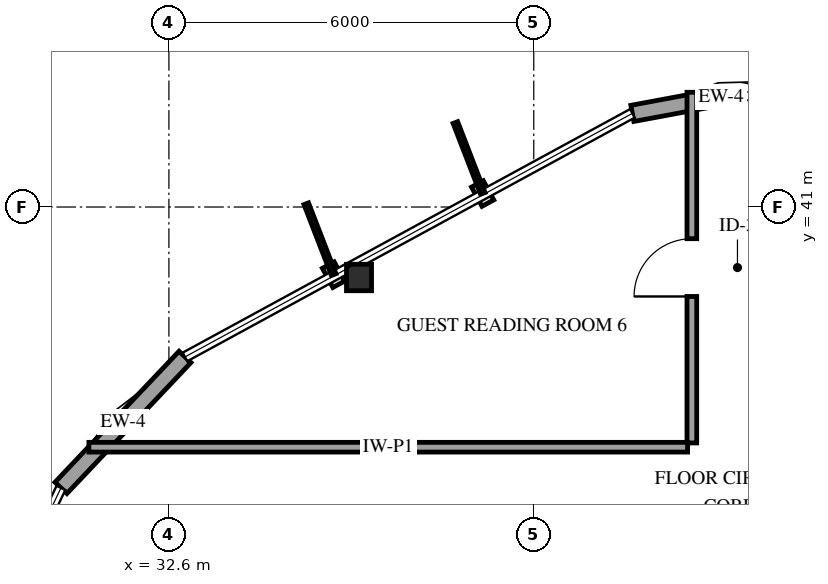
"""IFC4 building model, lengths in metres.
Left out: names, types, materials, properties, quantities, classifications, styles, units other than length and angle.
Written with IfcOpenShell. Run it as: python <this file> out.ifc"""

import sys

from ifc_helpers import new_model, si_unit, direction, frame, frame_2d, origin, origin_2d, place, context, subcontext, project, spatial, rectangle, i_section, extrude, element, fill, save


model = new_model("IFC4")
c1 = context("Model", 3, precision=1e-05, world=origin(), true_north=direction((0.0, 1.0)))
c2 = subcontext(c1, "Body", "Model", "MODEL_VIEW")
j1 = project(units=[si_unit("LENGTHUNIT", "METRE"), si_unit("PLANEANGLEUNIT", "RADIAN")], contexts=[c1])
p1 = place(None, origin())
s1 = spatial("IfcSite", under=j1, at=p1, CompositionType="ELEMENT")
p2 = place(p1, origin())
s2 = spatial("IfcBuilding", under=s1, at=p2, CompositionType="ELEMENT")
p3 = place(p2, frame((0.0, 0.0, 139.0)))
s3 = spatial("IfcBuildingStorey", under=s2, at=p3, CompositionType="ELEMENT", Elevation=139.0)
p4 = place(p3, frame((35.726, 39.841, -0.3), z_axis=(0.0, 0.0, 1.0), x_axis=(1.0, 0.0, 0.0)))
e1 = element("IfcColumn", 1, at=p4, inside=s3, PredefinedType="COLUMN", context=c2, shape_type="SweptSolid", body=[
    extrude(i_section(OverallWidth=0.412, OverallDepth=0.435, WebThickness=0.036, FlangeThickness=0.057, FilletRadius=0.038, at=origin_2d()), origin(), (0.0, 0.0, 1.0), 3.9),
])
p5 = place(p3, frame((43.138, 43.083, 0.0), z_axis=(0.0, 0.0, 1.0), x_axis=(-0.983060801599, -0.183279732538, 0.0)))
e2 = element("IfcWall", 2, at=p5, inside=s3, PredefinedType="SOLIDWALL", context=c2, shape_type="SweptSolid", body=[
    extrude(rectangle(XDim=2.967, YDim=0.27, at=frame_2d((1.483, 0.0))), origin(), (0.0, 0.0, 1.0), 2.679),
])
p6 = place(p5, frame((0.45, 0.0, 0.75)))
e3 = element("IfcOpeningElement", 3, at=p6, cuts=e2, PredefinedType="OPENING", context=c2, shape_type="SweptSolid", body=[
    extrude(rectangle(XDim=0.9, YDim=1.5, at=frame_2d((0.45, 0.75))), frame((0.0, 0.145, 0.0), z_axis=(0.0, -1.0, 0.0), x_axis=(1.0, 0.0, 0.0)), (0.0, 0.0, 1.0), 0.29),
])
p7 = place(p3, frame((32.865, 38.535, 0.0), z_axis=(0.0, 0.0, 1.0), x_axis=(-0.687587127065, -0.726101881759, 0.0)))
e4 = element("IfcWall", 4, at=p7, inside=s3, PredefinedType="SOLIDWALL", context=c2, shape_type="SweptSolid", body=[
    extrude(rectangle(XDim=2.967, YDim=0.27, at=frame_2d((1.483, 0.0))), origin(), (0.0, 0.0, 1.0), 2.679),
])
p8 = place(p3, frame((41.2, 37.12, 0.0), z_axis=(0.0, 0.0, 1.0), x_axis=(0.0, 1.0, 0.0)))
e5 = element("IfcWall", 5, at=p8, inside=s3, PredefinedType="PARTITIONING", context=c2, shape_type="SweptSolid", body=[
    extrude(rectangle(XDim=5.767, YDim=0.16, at=frame_2d((2.883, 0.0))), origin(), (0.0, 0.0, 1.0), 2.678),
])
p9 = place(p8, frame((2.409, 0.0, 0.0)))
e6 = element("IfcOpeningElement", 6, at=p9, cuts=e5, PredefinedType="OPENING", context=c2, shape_type="SweptSolid", body=[
    extrude(rectangle(XDim=0.95, YDim=2.15, at=frame_2d((0.475, 1.075))), frame((0.0, 0.09, 0.0), z_axis=(0.0, -1.0, 0.0), x_axis=(1.0, 0.0, 0.0)), (0.0, 0.0, 1.0), 0.18),
])
p10 = place(p3, frame((31.284, 37.05, 0.0), z_axis=(0.0, 0.0, 1.0), x_axis=(1.0, 0.0, 0.0)))
e7 = element("IfcWall", 7, at=p10, inside=s3, PredefinedType="PARTITIONING", context=c2, shape_type="SweptSolid", body=[
    extrude(rectangle(XDim=4.983, YDim=0.16, at=frame_2d((2.492, 0.0))), origin(), (0.0, 0.0, 1.0), 3.3),
])
p11 = place(p3, frame((36.268, 37.05, 0.0), z_axis=(0.0, 0.0, 1.0), x_axis=(1.0, 0.0, 0.0)))
e8 = element("IfcWall", 8, at=p11, inside=s3, PredefinedType="PARTITIONING", context=c2, shape_type="SweptSolid", body=[
    extrude(rectangle(XDim=4.862, YDim=0.16, at=frame_2d((2.431, 0.0))), origin(), (0.0, 0.0, 1.0), 3.3),
])
p12 = place(p6, origin())
e9 = element("IfcWindow", 9, at=p12, inside=s3, PartitioningType="SINGLE_PANEL", PredefinedType="WINDOW", context=c2, shape_type="SweptSolid", body=[
    extrude(rectangle(XDim=0.9, YDim=1.5, at=frame_2d((0.45, 0.75))), frame((0.0, 0.03, 0.0), z_axis=(0.0, -1.0, 0.0), x_axis=(1.0, 0.0, 0.0)), (0.0, 0.0, 1.0), 0.06),
])
fill(e3, e9)
p13 = place(p9, origin())
e10 = element("IfcDoor", 10, at=p13, inside=s3, OperationType="SINGLE_SWING_LEFT", PredefinedType="DOOR", context=c2, shape_type="SweptSolid", body=[
    extrude(rectangle(XDim=0.95, YDim=2.15, at=frame_2d((0.475, 1.075))), frame((0.0, 0.025, 0.0), z_axis=(0.0, -1.0, 0.0), x_axis=(1.0, 0.0, 0.0)), (0.0, 0.0, 1.0), 0.05),
])
fill(e6, e10)
save(model, sys.argv[1])
